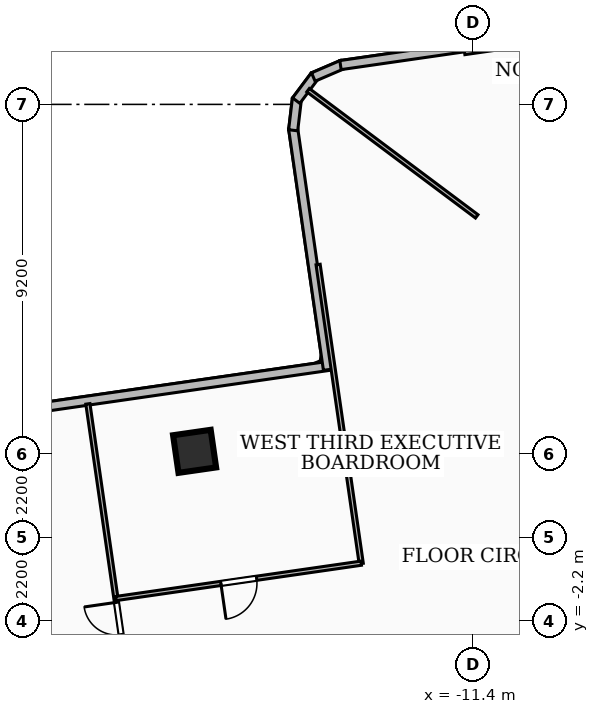
"""IFC4 building model, lengths in metres.
Left out: names, types, materials, properties, quantities, classifications, styles, units other than length and angle.
Written with IfcOpenShell. Run it as: python <this file> out.ifc"""

import sys

from ifc_helpers import new_model, si_unit, direction, frame, frame_2d, origin, origin_2d, place, context, subcontext, project, spatial, rectangle, extrude, element, fill, save


model = new_model("IFC4")
c1 = context("Model", 3, precision=1e-05, world=origin(), true_north=direction((0.0, 1.0)))
c2 = subcontext(c1, "Body", "Model", "MODEL_VIEW")
j1 = project(units=[si_unit("LENGTHUNIT", "METRE"), si_unit("PLANEANGLEUNIT", "RADIAN")], contexts=[c1])
p1 = place(None, origin())
s1 = spatial("IfcSite", under=j1, at=p1, CompositionType="ELEMENT")
p2 = place(p1, origin())
s2 = spatial("IfcBuilding", under=s1, at=p2, CompositionType="ELEMENT")
p3 = place(p2, frame((0.0, 0.0, 85.68)))
s3 = spatial("IfcBuildingStorey", under=s2, at=p3, CompositionType="ELEMENT", Elevation=85.68)
p4 = place(p3, frame((-18.724, 2.271, 0.0), z_axis=(0.0, 0.0, 1.0), x_axis=(0.989776230908, 0.142628933706, 0.0)))
e1 = element("IfcColumn", 1, at=p4, inside=s3, PredefinedType="COLUMN", context=c2, shape_type="SweptSolid", body=[
    extrude(rectangle(XDim=1.0, YDim=1.0, at=origin_2d()), origin(), (0.0, 0.0, 1.0), 3.6),
])
p5 = place(p3, frame((-31.244, 2.206, 0.0), z_axis=(0.0, 0.0, 1.0), x_axis=(0.989771419035, 0.142662321802, 0.0)))
e2 = element("IfcWall", 2, at=p5, inside=s3, PredefinedType="SOLIDWALL", context=c2, shape_type="SweptSolid", body=[
    extrude(rectangle(XDim=16.276, YDim=0.24, at=frame_2d((8.138, 0.0))), origin(), (0.0, 0.0, 1.0), 3.34),
])
p6 = place(p5, frame((1.1, 0.0, 0.85)))
e3 = element("IfcOpeningElement", 3, at=p6, cuts=e2, PredefinedType="OPENING", context=c2, shape_type="SweptSolid", body=[
    extrude(rectangle(XDim=1.8, YDim=2.0, at=frame_2d((0.9, 1.0))), frame((0.0, 0.13, 0.0), z_axis=(0.0, -1.0, 0.0), x_axis=(1.0, 0.0, 0.0)), (0.0, 0.0, 1.0), 0.26),
])
p7 = place(p3, frame((-15.215, 4.419, 0.0), z_axis=(0.0, 0.0, 1.0), x_axis=(-0.14277438433, 0.989755260243, 0.0)))
e4 = element("IfcWall", 4, at=p7, inside=s3, PredefinedType="SOLIDWALL", context=c2, shape_type="SweptSolid", body=[
    extrude(rectangle(XDim=6.416, YDim=0.24, at=frame_2d((3.208, 0.0))), origin(), (0.0, 0.0, 1.0), 3.34),
])
p8 = place(p3, frame((-16.13, 10.719, 0.0), z_axis=(0.0, 0.0, 1.0), x_axis=(0.117847211411, 0.993031739051, 0.0)))
e5 = element("IfcWall", 5, at=p8, inside=s3, PredefinedType="SOLIDWALL", context=c2, shape_type="SweptSolid", body=[
    extrude(rectangle(XDim=0.831, YDim=0.24, at=frame_2d((0.416, 0.0))), origin(), (0.0, 0.0, 1.0), 3.34),
])
p9 = place(p3, frame((-16.05, 11.499, 0.0), z_axis=(0.0, 0.0, 1.0), x_axis=(0.599903963027, 0.800072018724, 0.0)))
e6 = element("IfcWall", 6, at=p9, inside=s3, PredefinedType="SOLIDWALL", context=c2, shape_type="SweptSolid", body=[
    extrude(rectangle(XDim=0.813, YDim=0.24, at=frame_2d((0.407, 0.0))), origin(), (0.0, 0.0, 1.0), 3.34),
])
p10 = place(p3, frame((-15.6, 12.12, 0.0), z_axis=(0.0, 0.0, 1.0), x_axis=(0.918795004047, 0.394735025731, 0.0)))
e7 = element("IfcWall", 7, at=p10, inside=s3, PredefinedType="SOLIDWALL", context=c2, shape_type="SweptSolid", body=[
    extrude(rectangle(XDim=0.831, YDim=0.24, at=frame_2d((0.415, 0.0))), origin(), (0.0, 0.0, 1.0), 3.34),
])
p11 = place(p3, frame((-14.885, 12.434, 0.0), z_axis=(0.0, 0.0, 1.0), x_axis=(0.989767068769, 0.142692500085, 0.0)))
e8 = element("IfcWall", 8, at=p11, inside=s3, PredefinedType="SOLIDWALL", context=c2, shape_type="SweptSolid", body=[
    extrude(rectangle(XDim=6.775, YDim=0.24, at=frame_2d((3.388, 0.0))), origin(), (0.0, 0.0, 1.0), 3.34),
])
p12 = place(p3, frame((-11.3, 8.454, 0.0), z_axis=(0.0, 0.0, 1.0), x_axis=(-0.80074999449, 0.598998703107, 0.0)))
e9 = element("IfcWall", 9, at=p12, inside=s3, PredefinedType="PARTITIONING", context=c2, shape_type="SweptSolid", body=[
    extrude(rectangle(XDim=5.542, YDim=0.11, at=frame_2d((2.771, 0.0))), origin(), (0.0, 0.0, 1.0), 3.34),
])
p13 = place(p3, frame((-3.394, 13.949, 0.0), z_axis=(0.0, 0.0, 1.0), x_axis=(-0.989762369657, -0.142725091033, 0.0)))
e10 = element("IfcWall", 10, at=p13, inside=s3, PredefinedType="PARTITIONING", context=c2, shape_type="SweptSolid", body=[
    extrude(rectangle(XDim=8.31, YDim=0.11, at=frame_2d((4.155, 0.0))), origin(), (0.0, 0.0, 1.0), 2.486),
])
p14 = place(p3, frame((-15.474, 7.186, 0.0), z_axis=(0.0, 0.0, 1.0), x_axis=(0.142779920322, -0.989754461648, 0.0)))
e11 = element("IfcWall", 11, at=p14, inside=s3, PredefinedType="PARTITIONING", context=c2, shape_type="SweptSolid", body=[
    extrude(rectangle(XDim=7.949, YDim=0.11, at=frame_2d((3.975, 0.0))), origin(), (0.0, 0.0, 1.0), 2.486),
])
p15 = place(p3, frame((-14.341, -0.672, 0.0), z_axis=(0.0, 0.0, 1.0), x_axis=(-0.989774990044, -0.142637544439, 0.0)))
e12 = element("IfcWall", 12, at=p15, inside=s3, PredefinedType="PARTITIONING", context=c2, shape_type="SweptSolid", body=[
    extrude(rectangle(XDim=6.52, YDim=0.11, at=frame_2d((3.26, 0.0))), origin(), (0.0, 0.0, 1.0), 3.34),
])
p16 = place(p15, frame((2.78, 0.0, 0.0)))
e13 = element("IfcOpeningElement", 13, at=p16, cuts=e12, PredefinedType="OPENING", context=c2, shape_type="SweptSolid", body=[
    extrude(rectangle(XDim=0.95, YDim=2.08, at=frame_2d((0.475, 1.04))), frame((0.0, 0.065, 0.0), z_axis=(0.0, -1.0, 0.0), x_axis=(1.0, 0.0, 0.0)), (0.0, 0.0, 1.0), 0.13),
])
p17 = place(p3, frame((-19.713, -9.1, 0.0), z_axis=(0.0, 0.0, 1.0), x_axis=(-0.142667743944, 0.98977063749, 0.0)))
e14 = element("IfcWall", 14, at=p17, inside=s3, PredefinedType="PARTITIONING", context=c2, shape_type="SweptSolid", body=[
    extrude(rectangle(XDim=12.75, YDim=0.11, at=frame_2d((6.375, 0.0))), origin(), (0.0, 0.0, 1.0), 2.486),
])
p18 = place(p17, frame((6.615, 0.0, 0.0)))
e15 = element("IfcOpeningElement", 15, at=p18, cuts=e14, PredefinedType="OPENING", context=c2, shape_type="SweptSolid", body=[
    extrude(rectangle(XDim=0.86, YDim=2.04, at=frame_2d((0.43, 1.02))), frame((0.0, 0.065, 0.0), z_axis=(0.0, -1.0, 0.0), x_axis=(1.0, 0.0, 0.0)), (0.0, 0.0, 1.0), 0.13),
])
p19 = place(p17, frame((5.414, 0.0, 0.0)))
e16 = element("IfcOpeningElement", 16, at=p19, cuts=e14, PredefinedType="OPENING", context=c2, shape_type="SweptSolid", body=[
    extrude(rectangle(XDim=0.86, YDim=2.04, at=frame_2d((0.43, 1.02))), frame((0.0, 0.065, 0.0), z_axis=(0.0, -1.0, 0.0), x_axis=(1.0, 0.0, 0.0)), (0.0, 0.0, 1.0), 0.13),
])
p20 = place(p16, origin())
e17 = element("IfcDoor", 17, at=p20, inside=s3, OperationType="SINGLE_SWING_RIGHT", PredefinedType="DOOR", context=c2, shape_type="SweptSolid", body=[
    extrude(rectangle(XDim=0.95, YDim=2.08, at=frame_2d((0.475, 1.04))), frame((0.0, 0.025, 0.0), z_axis=(0.0, -1.0, 0.0), x_axis=(1.0, 0.0, 0.0)), (0.0, 0.0, 1.0), 0.05),
])
fill(e13, e17)
p21 = place(p18, origin())
e18 = element("IfcDoor", 18, at=p21, inside=s3, OperationType="SINGLE_SWING_RIGHT", PredefinedType="DOOR", context=c2, shape_type="SweptSolid", body=[
    extrude(rectangle(XDim=0.86, YDim=2.04, at=frame_2d((0.43, 1.02))), frame((0.0, 0.025, 0.0), z_axis=(0.0, -1.0, 0.0), x_axis=(1.0, 0.0, 0.0)), (0.0, 0.0, 1.0), 0.05),
])
fill(e15, e18)
save(model, sys.argv[1])
